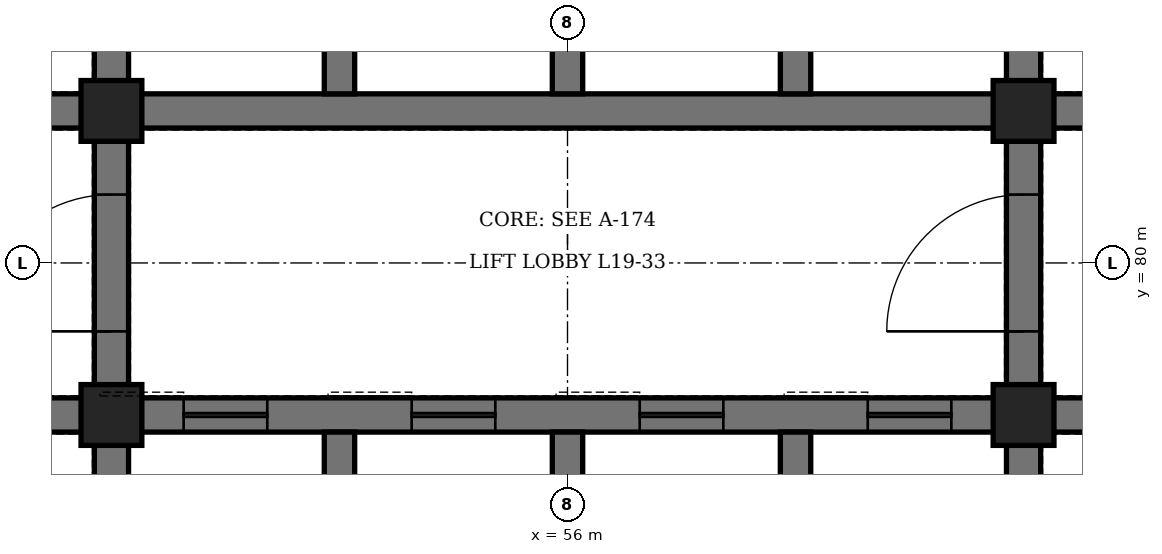
"""IFC4 building model, lengths in metres.
Left out: names, types, materials, properties, quantities, classifications, styles, units other than length and angle.
Written with IfcOpenShell. Run it as: python <this file> out.ifc"""

import sys

from ifc_helpers import new_model, si_unit, direction, frame, frame_2d, origin, origin_2d, place, context, subcontext, project, spatial, rectangle, hollow_rectangle, extrude, element, fill, save


model = new_model("IFC4")
c1 = context("Model", 3, precision=1e-05, world=origin(), true_north=direction((0.0, 1.0)))
c2 = subcontext(c1, "Body", "Model", "MODEL_VIEW")
j1 = project(units=[si_unit("LENGTHUNIT", "METRE"), si_unit("PLANEANGLEUNIT", "RADIAN")], contexts=[c1])
p1 = place(None, origin())
s1 = spatial("IfcSite", under=j1, at=p1, CompositionType="ELEMENT")
p2 = place(p1, origin())
s2 = spatial("IfcBuilding", under=s1, at=p2, CompositionType="ELEMENT")
p3 = place(p2, frame((0.0, 0.0, 89.5)))
s3 = spatial("IfcBuildingStorey", under=s2, at=p3, CompositionType="ELEMENT", Elevation=89.5)
p4 = place(p3, frame((50.0, 71.6, 0.0), z_axis=(0.0, 0.0, 1.0), x_axis=(0.0, 1.0, 0.0)))
e1 = element("IfcWall", 1, at=p4, inside=s3, PredefinedType="SHEAR", context=c2, shape_type="SweptSolid", body=[
    extrude(rectangle(XDim=16.8, YDim=0.45, at=frame_2d((8.4, 0.0))), origin(), (0.0, 0.0, 1.0), 4.2),
])
p5 = place(p4, frame((7.5, 0.0, 0.0)))
e2 = element("IfcOpeningElement", 2, at=p5, cuts=e1, PredefinedType="OPENING", context=c2, shape_type="SweptSolid", body=[
    extrude(rectangle(XDim=1.8, YDim=2.4, at=frame_2d((0.9, 1.2))), frame((0.0, 0.235, 0.0), z_axis=(0.0, -1.0, 0.0), x_axis=(1.0, 0.0, 0.0)), (0.0, 0.0, 1.0), 0.47),
])
p6 = place(p3, frame((62.0, 71.6, 0.0), z_axis=(0.0, 0.0, 1.0), x_axis=(0.0, 1.0, 0.0)))
e3 = element("IfcWall", 3, at=p6, inside=s3, PredefinedType="SHEAR", context=c2, shape_type="SweptSolid", body=[
    extrude(rectangle(XDim=16.8, YDim=0.45, at=frame_2d((8.4, 0.0))), origin(), (0.0, 0.0, 1.0), 4.2),
])
p7 = place(p6, frame((7.5, 0.0, 0.0)))
e4 = element("IfcOpeningElement", 4, at=p7, cuts=e3, PredefinedType="OPENING", context=c2, shape_type="SweptSolid", body=[
    extrude(rectangle(XDim=1.8, YDim=2.4, at=frame_2d((0.9, 1.2))), frame((0.0, 0.235, 0.0), z_axis=(0.0, -1.0, 0.0), x_axis=(1.0, 0.0, 0.0)), (0.0, 0.0, 1.0), 0.47),
])
p8 = place(p3, frame((44.6, 78.0, 0.0), z_axis=(0.0, 0.0, 1.0), x_axis=(1.0, 0.0, 0.0)))
e5 = element("IfcWall", 5, at=p8, inside=s3, PredefinedType="SHEAR", context=c2, shape_type="SweptSolid", body=[
    extrude(rectangle(XDim=5.175, YDim=0.45, at=frame_2d((2.587, 0.0))), origin(), (0.0, 0.0, 1.0), 4.2),
])
p9 = place(p8, frame((1.8, 0.0, 0.0)))
e6 = element("IfcOpeningElement", 6, at=p9, cuts=e5, PredefinedType="OPENING", context=c2, shape_type="SweptSolid", body=[
    extrude(rectangle(XDim=1.2, YDim=2.1, at=frame_2d((0.6, 1.05))), frame((0.0, 0.235, 0.0), z_axis=(0.0, -1.0, 0.0), x_axis=(1.0, 0.0, 0.0)), (0.0, 0.0, 1.0), 0.47),
])
p10 = place(p3, frame((44.6, 82.0, 0.0), z_axis=(0.0, 0.0, 1.0), x_axis=(1.0, 0.0, 0.0)))
e7 = element("IfcWall", 7, at=p10, inside=s3, PredefinedType="SHEAR", context=c2, shape_type="SweptSolid", body=[
    extrude(rectangle(XDim=5.175, YDim=0.45, at=frame_2d((2.587, 0.0))), origin(), (0.0, 0.0, 1.0), 4.2),
])
p11 = place(p10, frame((0.7, 0.0, 0.0)))
e8 = element("IfcOpeningElement", 8, at=p11, cuts=e7, PredefinedType="OPENING", context=c2, shape_type="SweptSolid", body=[
    extrude(rectangle(XDim=0.9, YDim=2.1, at=frame_2d((0.45, 1.05))), frame((0.0, 0.235, 0.0), z_axis=(0.0, -1.0, 0.0), x_axis=(1.0, 0.0, 0.0)), (0.0, 0.0, 1.0), 0.47),
])
p12 = place(p3, frame((62.225, 78.0, 0.0), z_axis=(0.0, 0.0, 1.0), x_axis=(1.0, 0.0, 0.0)))
e9 = element("IfcWall", 9, at=p12, inside=s3, PredefinedType="SHEAR", context=c2, shape_type="SweptSolid", body=[
    extrude(rectangle(XDim=5.175, YDim=0.45, at=frame_2d((2.587, 0.0))), origin(), (0.0, 0.0, 1.0), 4.2),
])
p13 = place(p12, frame((2.175, 0.0, 0.0)))
e10 = element("IfcOpeningElement", 10, at=p13, cuts=e9, PredefinedType="OPENING", context=c2, shape_type="SweptSolid", body=[
    extrude(rectangle(XDim=1.2, YDim=2.1, at=frame_2d((0.6, 1.05))), frame((0.0, 0.235, 0.0), z_axis=(0.0, -1.0, 0.0), x_axis=(1.0, 0.0, 0.0)), (0.0, 0.0, 1.0), 0.47),
])
p14 = place(p3, frame((62.225, 82.0, 0.0), z_axis=(0.0, 0.0, 1.0), x_axis=(1.0, 0.0, 0.0)))
e11 = element("IfcWall", 11, at=p14, inside=s3, PredefinedType="SHEAR", context=c2, shape_type="SweptSolid", body=[
    extrude(rectangle(XDim=5.175, YDim=0.45, at=frame_2d((2.587, 0.0))), origin(), (0.0, 0.0, 1.0), 4.2),
])
p15 = place(p14, frame((2.175, 0.0, 0.0)))
e12 = element("IfcOpeningElement", 12, at=p15, cuts=e11, PredefinedType="OPENING", context=c2, shape_type="SweptSolid", body=[
    extrude(rectangle(XDim=1.2, YDim=2.1, at=frame_2d((0.6, 1.05))), frame((0.0, 0.235, 0.0), z_axis=(0.0, -1.0, 0.0), x_axis=(1.0, 0.0, 0.0)), (0.0, 0.0, 1.0), 0.47),
])
p16 = place(p3, frame((50.225, 78.0, 0.0), z_axis=(0.0, 0.0, 1.0), x_axis=(1.0, 0.0, 0.0)))
e13 = element("IfcWall", 13, at=p16, inside=s3, PredefinedType="SHEAR", context=c2, shape_type="SweptSolid", body=[
    extrude(rectangle(XDim=11.55, YDim=0.45, at=frame_2d((5.775, 0.0))), origin(), (0.0, 0.0, 1.0), 4.2),
])
p17 = place(p16, frame((0.725, 0.0, 0.0)))
e14 = element("IfcOpeningElement", 14, at=p17, cuts=e13, PredefinedType="OPENING", context=c2, shape_type="SweptSolid", body=[
    extrude(rectangle(XDim=1.1, YDim=2.2, at=frame_2d((0.55, 1.1))), frame((0.0, 0.235, 0.0), z_axis=(0.0, -1.0, 0.0), x_axis=(1.0, 0.0, 0.0)), (0.0, 0.0, 1.0), 0.47),
])
p18 = place(p16, frame((3.725, 0.0, 0.0)))
e15 = element("IfcOpeningElement", 15, at=p18, cuts=e13, PredefinedType="OPENING", context=c2, shape_type="SweptSolid", body=[
    extrude(rectangle(XDim=1.1, YDim=2.2, at=frame_2d((0.55, 1.1))), frame((0.0, 0.235, 0.0), z_axis=(0.0, -1.0, 0.0), x_axis=(1.0, 0.0, 0.0)), (0.0, 0.0, 1.0), 0.47),
])
p19 = place(p16, frame((6.725, 0.0, 0.0)))
e16 = element("IfcOpeningElement", 16, at=p19, cuts=e13, PredefinedType="OPENING", context=c2, shape_type="SweptSolid", body=[
    extrude(rectangle(XDim=1.1, YDim=2.2, at=frame_2d((0.55, 1.1))), frame((0.0, 0.235, 0.0), z_axis=(0.0, -1.0, 0.0), x_axis=(1.0, 0.0, 0.0)), (0.0, 0.0, 1.0), 0.47),
])
p20 = place(p16, frame((9.725, 0.0, 0.0)))
e17 = element("IfcOpeningElement", 17, at=p20, cuts=e13, PredefinedType="OPENING", context=c2, shape_type="SweptSolid", body=[
    extrude(rectangle(XDim=1.1, YDim=2.2, at=frame_2d((0.55, 1.1))), frame((0.0, 0.235, 0.0), z_axis=(0.0, -1.0, 0.0), x_axis=(1.0, 0.0, 0.0)), (0.0, 0.0, 1.0), 0.47),
])
p21 = place(p3, frame((50.225, 82.0, 0.0), z_axis=(0.0, 0.0, 1.0), x_axis=(1.0, 0.0, 0.0)))
e18 = element("IfcWall", 18, at=p21, inside=s3, PredefinedType="SHEAR", context=c2, shape_type="SweptSolid", body=[
    extrude(rectangle(XDim=11.55, YDim=0.45, at=frame_2d((5.775, 0.0))), origin(), (0.0, 0.0, 1.0), 4.2),
])
p22 = place(p3, frame((53.0, 74.2, 0.0), z_axis=(0.0, 0.0, 1.0), x_axis=(0.0, 1.0, 0.0)))
e19 = element("IfcWall", 19, at=p22, inside=s3, PredefinedType="SHEAR", context=c2, shape_type="SweptSolid", body=[
    extrude(rectangle(XDim=3.575, YDim=0.4, at=frame_2d((1.788, 0.0))), origin(), (0.0, 0.0, 1.0), 4.2),
])
p23 = place(p3, frame((53.0, 82.225, 0.0), z_axis=(0.0, 0.0, 1.0), x_axis=(0.0, 1.0, 0.0)))
e20 = element("IfcWall", 20, at=p23, inside=s3, PredefinedType="SHEAR", context=c2, shape_type="SweptSolid", body=[
    extrude(rectangle(XDim=3.55, YDim=0.4, at=frame_2d((1.775, 0.0))), origin(), (0.0, 0.0, 1.0), 4.2),
])
p24 = place(p3, frame((56.0, 74.2, 0.0), z_axis=(0.0, 0.0, 1.0), x_axis=(0.0, 1.0, 0.0)))
e21 = element("IfcWall", 21, at=p24, inside=s3, PredefinedType="SHEAR", context=c2, shape_type="SweptSolid", body=[
    extrude(rectangle(XDim=3.575, YDim=0.4, at=frame_2d((1.788, 0.0))), origin(), (0.0, 0.0, 1.0), 4.2),
])
p25 = place(p3, frame((56.0, 82.225, 0.0), z_axis=(0.0, 0.0, 1.0), x_axis=(0.0, 1.0, 0.0)))
e22 = element("IfcWall", 22, at=p25, inside=s3, PredefinedType="SHEAR", context=c2, shape_type="SweptSolid", body=[
    extrude(rectangle(XDim=3.55, YDim=0.4, at=frame_2d((1.775, 0.0))), origin(), (0.0, 0.0, 1.0), 4.2),
])
p26 = place(p3, frame((59.0, 74.2, 0.0), z_axis=(0.0, 0.0, 1.0), x_axis=(0.0, 1.0, 0.0)))
e23 = element("IfcWall", 23, at=p26, inside=s3, PredefinedType="SHEAR", context=c2, shape_type="SweptSolid", body=[
    extrude(rectangle(XDim=3.575, YDim=0.4, at=frame_2d((1.788, 0.0))), origin(), (0.0, 0.0, 1.0), 4.2),
])
p27 = place(p3, frame((59.0, 82.225, 0.0), z_axis=(0.0, 0.0, 1.0), x_axis=(0.0, 1.0, 0.0)))
e24 = element("IfcWall", 24, at=p27, inside=s3, PredefinedType="SHEAR", context=c2, shape_type="SweptSolid", body=[
    extrude(rectangle(XDim=3.55, YDim=0.4, at=frame_2d((1.775, 0.0))), origin(), (0.0, 0.0, 1.0), 4.2),
])
for number, where, z_axis, x_axis in (
    (25, (50.0, 78.0, 0.0), (0.0, 0.0, 1.0), (1.0, 0.0, 0.0)),
    (26, (50.0, 82.0, 0.0), (0.0, 0.0, 1.0), (1.0, 0.0, 0.0)),
    (27, (62.0, 78.0, 0.0), (0.0, 0.0, 1.0), (1.0, 0.0, 0.0)),
    (28, (62.0, 82.0, 0.0), (0.0, 0.0, 1.0), (1.0, 0.0, 0.0)),
):
    element("IfcColumn", number, at=place(p3, frame(where, z_axis=z_axis, x_axis=x_axis)), inside=s3, PredefinedType="COLUMN", context=c2, shape_type="SweptSolid", body=[
        extrude(hollow_rectangle(XDim=0.8, YDim=0.8, WallThickness=0.1, at=origin_2d()), origin(), (0.0, 0.0, 1.0), 4.2),
    ])
p28 = place(p5, origin())
e29 = element("IfcDoor", 29, at=p28, inside=s3, OperationType="DOUBLE_DOOR_SINGLE_SWING", PredefinedType="DOOR", context=c2, shape_type="SweptSolid", body=[
    extrude(rectangle(XDim=1.8, YDim=2.4, at=frame_2d((0.9, 1.2))), frame((0.0, 0.225, 0.0), z_axis=(0.0, -1.0, 0.0), x_axis=(1.0, 0.0, 0.0)), (0.0, 0.0, 1.0), 0.449),
])
fill(e2, e29)
p29 = place(p7, origin())
e30 = element("IfcDoor", 30, at=p29, inside=s3, OperationType="DOUBLE_DOOR_SINGLE_SWING", PredefinedType="DOOR", context=c2, shape_type="SweptSolid", body=[
    extrude(rectangle(XDim=1.8, YDim=2.4, at=frame_2d((0.9, 1.2))), frame((0.0, 0.225, 0.0), z_axis=(0.0, -1.0, 0.0), x_axis=(1.0, 0.0, 0.0)), (0.0, 0.0, 1.0), 0.449),
])
fill(e4, e30)
p30 = place(p17, origin())
e31 = element("IfcDoor", 31, at=p30, inside=s3, OperationType="SLIDING_TO_LEFT", PredefinedType="DOOR", context=c2, shape_type="SweptSolid", body=[
    extrude(rectangle(XDim=1.1, YDim=2.2, at=frame_2d((0.55, 1.1))), frame((0.0, 0.225, 0.0), z_axis=(0.0, -1.0, 0.0), x_axis=(1.0, 0.0, 0.0)), (0.0, 0.0, 1.0), 0.449),
])
fill(e14, e31)
p31 = place(p18, origin())
e32 = element("IfcDoor", 32, at=p31, inside=s3, OperationType="SLIDING_TO_LEFT", PredefinedType="DOOR", context=c2, shape_type="SweptSolid", body=[
    extrude(rectangle(XDim=1.1, YDim=2.2, at=frame_2d((0.55, 1.1))), frame((0.0, 0.225, 0.0), z_axis=(0.0, -1.0, 0.0), x_axis=(1.0, 0.0, 0.0)), (0.0, 0.0, 1.0), 0.449),
])
fill(e15, e32)
p32 = place(p19, origin())
e33 = element("IfcDoor", 33, at=p32, inside=s3, OperationType="SLIDING_TO_LEFT", PredefinedType="DOOR", context=c2, shape_type="SweptSolid", body=[
    extrude(rectangle(XDim=1.1, YDim=2.2, at=frame_2d((0.55, 1.1))), frame((0.0, 0.225, 0.0), z_axis=(0.0, -1.0, 0.0), x_axis=(1.0, 0.0, 0.0)), (0.0, 0.0, 1.0), 0.449),
])
fill(e16, e33)
p33 = place(p20, origin())
e34 = element("IfcDoor", 34, at=p33, inside=s3, OperationType="SLIDING_TO_LEFT", PredefinedType="DOOR", context=c2, shape_type="SweptSolid", body=[
    extrude(rectangle(XDim=1.1, YDim=2.2, at=frame_2d((0.55, 1.1))), frame((0.0, 0.225, 0.0), z_axis=(0.0, -1.0, 0.0), x_axis=(1.0, 0.0, 0.0)), (0.0, 0.0, 1.0), 0.449),
])
fill(e17, e34)
save(model, sys.argv[1])
